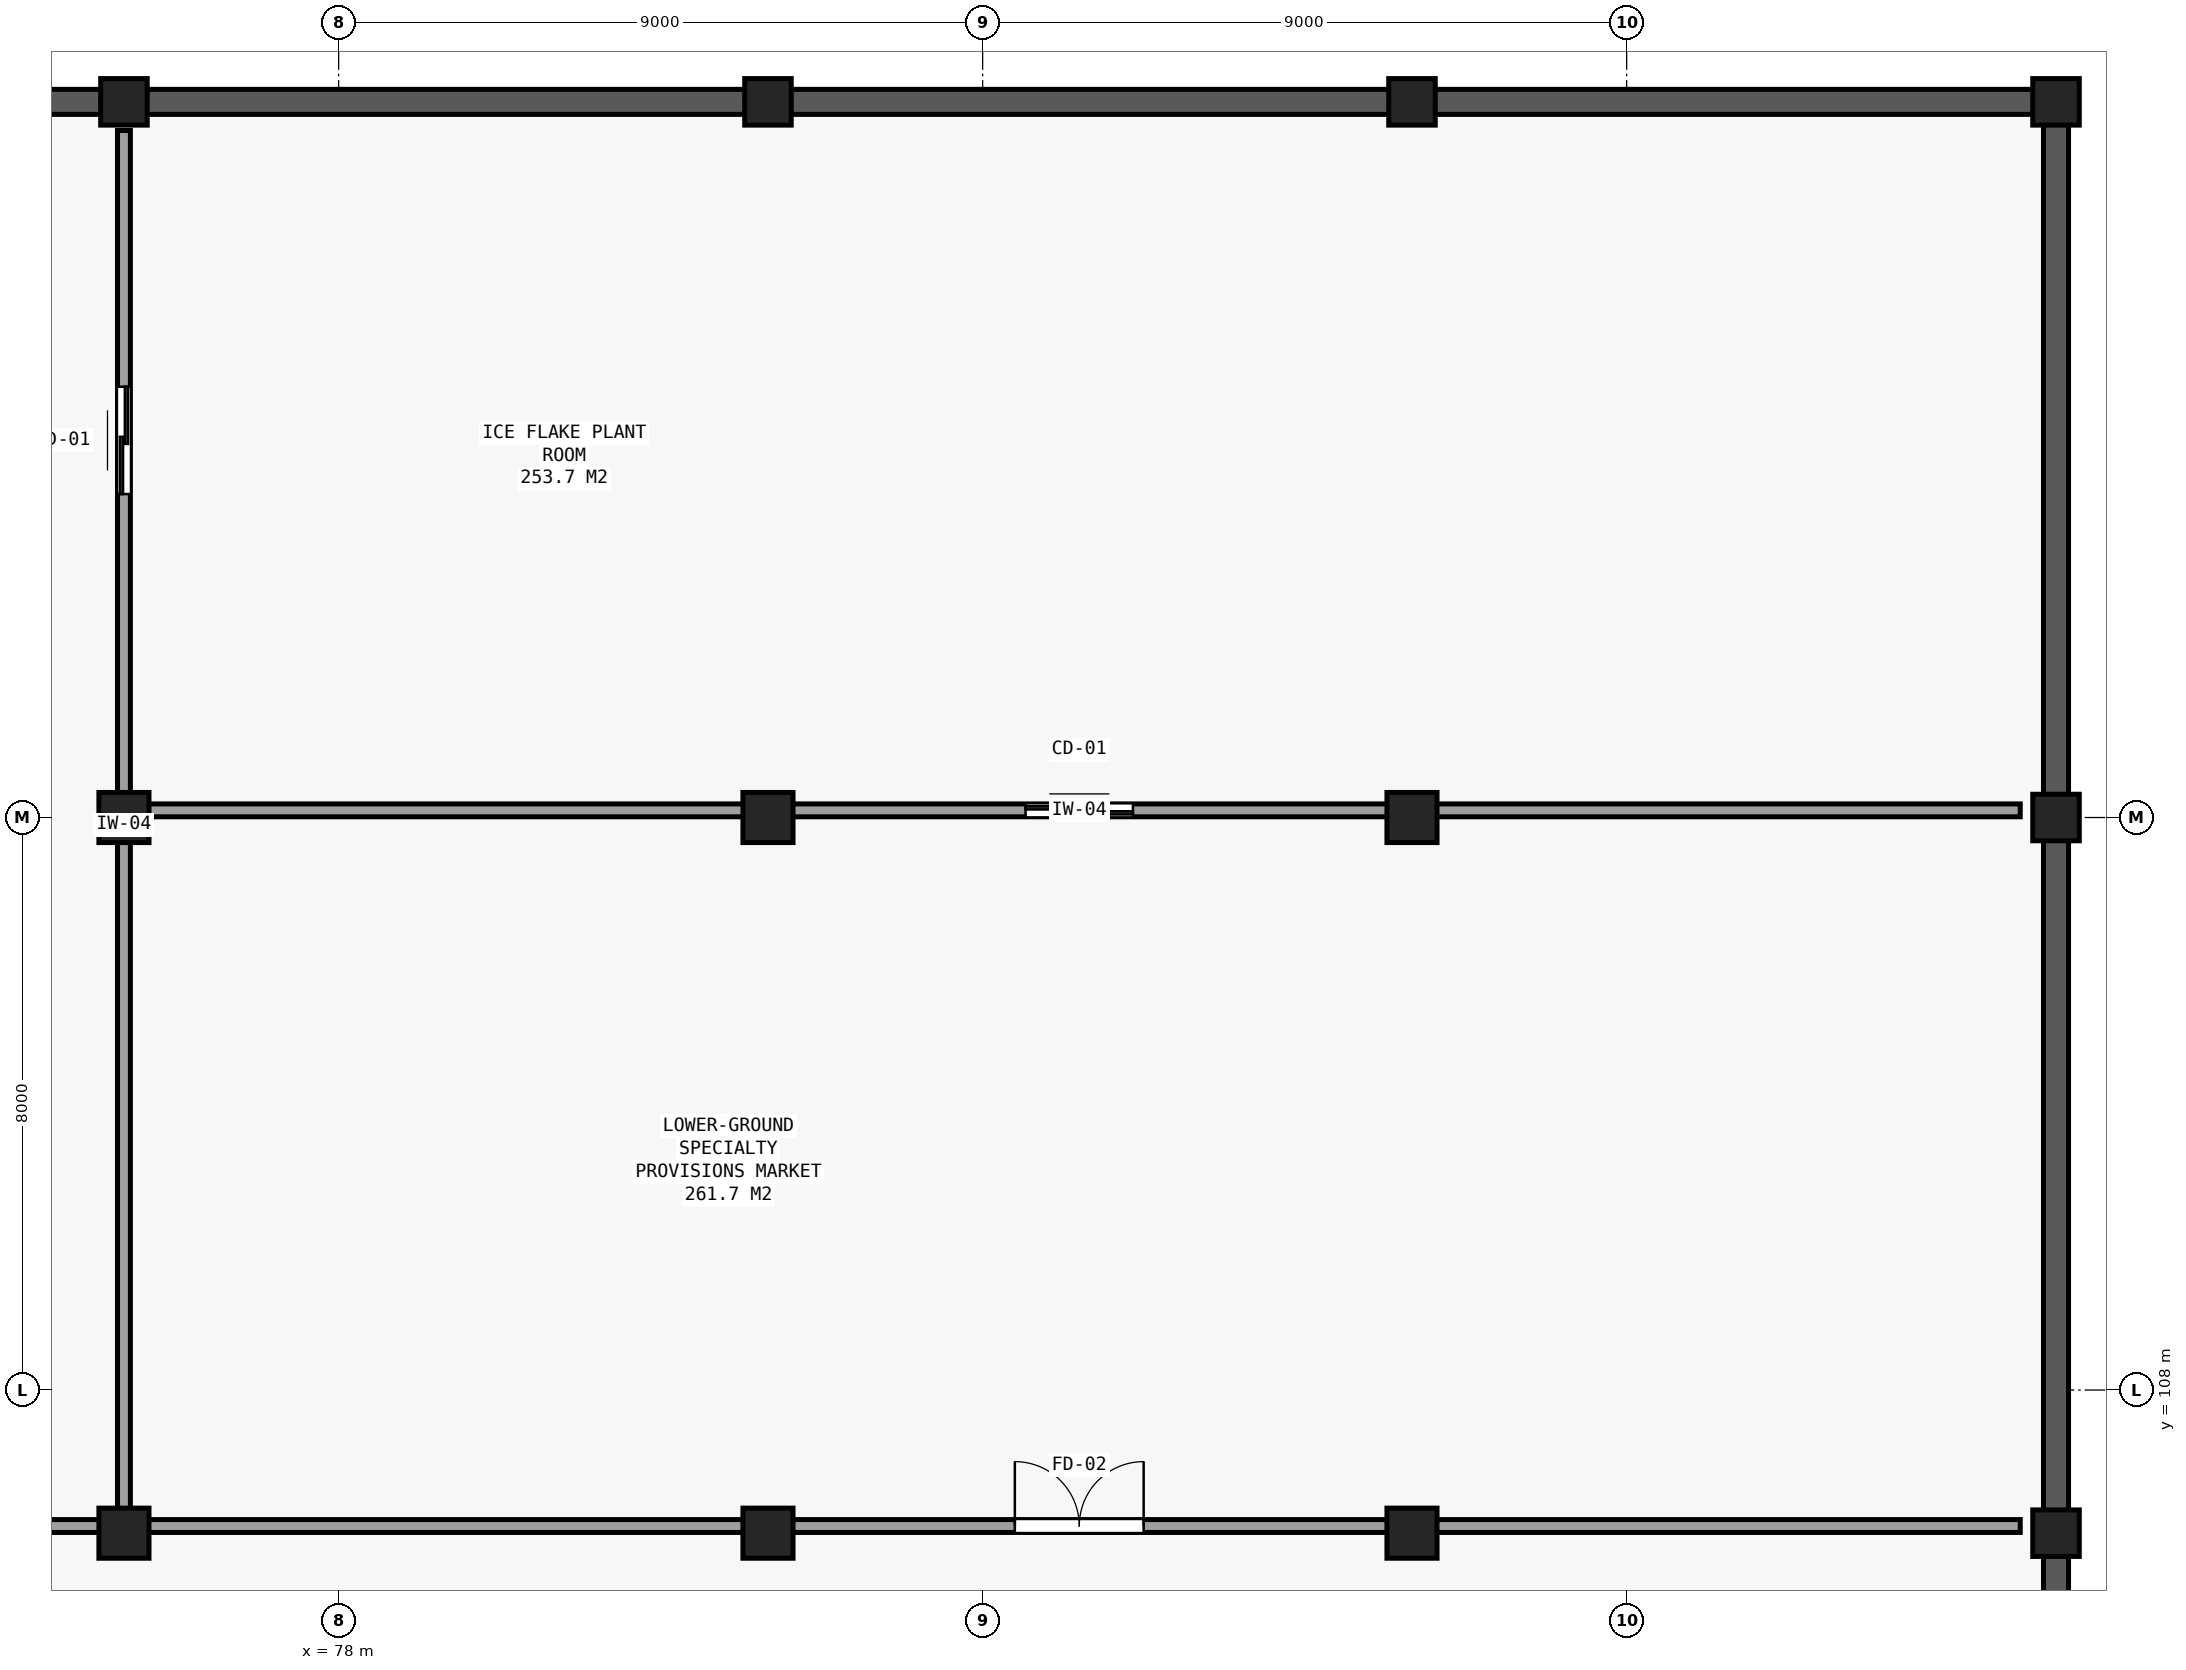
"""IFC4 building model, lengths in metres.
Left out: names, types, materials, properties, quantities, classifications, styles, units other than length and angle.
Written with IfcOpenShell. Run it as: python <this file> out.ifc"""

import sys

from ifc_helpers import new_model, si_unit, direction, frame, frame_2d, origin, origin_2d, place, context, subcontext, project, spatial, rectangle, extrude, element, fill, save


model = new_model("IFC4")
c1 = context("Model", 3, precision=1e-05, world=origin(), true_north=direction((0.0, 1.0)))
c2 = subcontext(c1, "Body", "Model", "MODEL_VIEW")
j1 = project(units=[si_unit("LENGTHUNIT", "METRE"), si_unit("PLANEANGLEUNIT", "RADIAN")], contexts=[c1])
p1 = place(None, origin())
s1 = spatial("IfcSite", under=j1, at=p1, CompositionType="ELEMENT")
p2 = place(p1, origin())
s2 = spatial("IfcBuilding", under=s1, at=p2, CompositionType="ELEMENT")
p3 = place(p2, frame((0.0, 0.0, -4.2)))
s3 = spatial("IfcBuildingStorey", under=s2, at=p3, CompositionType="ELEMENT", Elevation=-4.2)
for number, where, z_axis, x_axis in (
    (1, (75.0, 106.0, -0.4), (0.0, 0.0, 1.0), (1.0, 0.0, 0.0)),
    (2, (75.0, 116.0, -0.4), (0.0, 0.0, 1.0), (1.0, 0.0, 0.0)),
):
    element("IfcColumn", number, at=place(p3, frame(where, z_axis=z_axis, x_axis=x_axis)), inside=s3, PredefinedType="COLUMN", context=c2, shape_type="SweptSolid", body=[
        extrude(rectangle(XDim=0.7, YDim=0.7, at=origin_2d()), origin(), (0.0, 0.0, 1.0), 4.6),
    ])
p4 = place(p3, frame((75.0, 126.0, -0.4), z_axis=(0.0, 0.0, 1.0), x_axis=(1.0, 0.0, 0.0)))
e3 = element("IfcColumn", 3, at=p4, inside=s3, PredefinedType="COLUMN", context=c2, shape_type="SweptSolid", body=[
    extrude(rectangle(XDim=0.65, YDim=0.65, at=origin_2d()), origin(), (0.0, 0.0, 1.0), 4.6),
])
for number, where, z_axis, x_axis in (
    (4, (84.0, 106.0, -0.4), (0.0, 0.0, 1.0), (1.0, 0.0, 0.0)),
    (5, (84.0, 116.0, -0.4), (0.0, 0.0, 1.0), (1.0, 0.0, 0.0)),
):
    element("IfcColumn", number, at=place(p3, frame(where, z_axis=z_axis, x_axis=x_axis)), inside=s3, PredefinedType="COLUMN", context=c2, shape_type="SweptSolid", body=[
        extrude(rectangle(XDim=0.7, YDim=0.7, at=origin_2d()), origin(), (0.0, 0.0, 1.0), 4.6),
    ])
p5 = place(p3, frame((84.0, 126.0, -0.4), z_axis=(0.0, 0.0, 1.0), x_axis=(1.0, 0.0, 0.0)))
e6 = element("IfcColumn", 6, at=p5, inside=s3, PredefinedType="COLUMN", context=c2, shape_type="SweptSolid", body=[
    extrude(rectangle(XDim=0.65, YDim=0.65, at=origin_2d()), origin(), (0.0, 0.0, 1.0), 4.6),
])
for number, where, z_axis, x_axis in (
    (7, (93.0, 106.0, -0.4), (0.0, 0.0, 1.0), (1.0, 0.0, 0.0)),
    (8, (93.0, 116.0, -0.4), (0.0, 0.0, 1.0), (1.0, 0.0, 0.0)),
):
    element("IfcColumn", number, at=place(p3, frame(where, z_axis=z_axis, x_axis=x_axis)), inside=s3, PredefinedType="COLUMN", context=c2, shape_type="SweptSolid", body=[
        extrude(rectangle(XDim=0.7, YDim=0.7, at=origin_2d()), origin(), (0.0, 0.0, 1.0), 4.6),
    ])
for number, where, z_axis, x_axis in (
    (9, (93.0, 126.0, -0.4), (0.0, 0.0, 1.0), (1.0, 0.0, 0.0)),
    (10, (102.0, 106.0, -0.4), (0.0, 0.0, 1.0), (1.0, 0.0, 0.0)),
    (11, (102.0, 116.0, -0.4), (0.0, 0.0, 1.0), (1.0, 0.0, 0.0)),
    (12, (102.0, 126.0, -0.4), (0.0, 0.0, 1.0), (1.0, 0.0, 0.0)),
):
    element("IfcColumn", number, at=place(p3, frame(where, z_axis=z_axis, x_axis=x_axis)), inside=s3, PredefinedType="COLUMN", context=c2, shape_type="SweptSolid", body=[
        extrude(rectangle(XDim=0.65, YDim=0.65, at=origin_2d()), origin(), (0.0, 0.0, 1.0), 4.6),
    ])
for number, where, z_axis, x_axis in (
    (13, (66.0, 126.0, 0.0), (0.0, 0.0, 1.0), (1.0, 0.0, 0.0)),
    (14, (75.0, 126.0, 0.0), (0.0, 0.0, 1.0), (1.0, 0.0, 0.0)),
    (15, (84.0, 126.0, 0.0), (0.0, 0.0, 1.0), (1.0, 0.0, 0.0)),
    (16, (93.0, 126.0, 0.0), (0.0, 0.0, 1.0), (1.0, 0.0, 0.0)),
):
    element("IfcWall", number, at=place(p3, frame(where, z_axis=z_axis, x_axis=x_axis)), inside=s3, PredefinedType="SOLIDWALL", context=c2, shape_type="SweptSolid", body=[
        extrude(rectangle(XDim=9.0, YDim=0.35, at=frame_2d((4.5, 0.0))), origin(), (0.0, 0.0, 1.0), 3.84),
    ])
for number, where, z_axis, x_axis in (
    (17, (102.0, 106.0, 0.0), (0.0, 0.0, 1.0), (0.0, -1.0, 0.0)),
    (18, (102.0, 116.0, 0.0), (0.0, 0.0, 1.0), (0.0, -1.0, 0.0)),
    (19, (102.0, 126.0, 0.0), (0.0, 0.0, 1.0), (0.0, -1.0, 0.0)),
):
    element("IfcWall", number, at=place(p3, frame(where, z_axis=z_axis, x_axis=x_axis)), inside=s3, PredefinedType="SOLIDWALL", context=c2, shape_type="SweptSolid", body=[
        extrude(rectangle(XDim=10.0, YDim=0.35, at=frame_2d((5.0, 0.0))), origin(), (0.0, 0.0, 1.0), 3.84),
    ])
p6 = place(p3, frame((48.2, 106.1, 0.0), z_axis=(0.0, 0.0, 1.0), x_axis=(1.0, 0.0, 0.0)))
e20 = element("IfcWall", 20, at=p6, inside=s3, PredefinedType="PARTITIONING", context=c2, shape_type="SweptSolid", body=[
    extrude(rectangle(XDim=26.6, YDim=0.18, at=frame_2d((13.3, 0.0))), origin(), (0.0, 0.0, 1.0), 2.94),
])
p7 = place(p6, frame((12.55, 0.0, 0.0)))
e21 = element("IfcOpeningElement", 21, at=p7, cuts=e20, PredefinedType="OPENING", context=c2, shape_type="SweptSolid", body=[
    extrude(rectangle(XDim=1.5, YDim=2.25, at=frame_2d((0.75, 1.125))), frame((0.0, 0.1, 0.0), z_axis=(0.0, -1.0, 0.0), x_axis=(1.0, 0.0, 0.0)), (0.0, 0.0, 1.0), 0.2),
])
p8 = place(p3, frame((75.2, 106.1, 0.0), z_axis=(0.0, 0.0, 1.0), x_axis=(1.0, 0.0, 0.0)))
e22 = element("IfcWall", 22, at=p8, inside=s3, PredefinedType="PARTITIONING", context=c2, shape_type="SweptSolid", body=[
    extrude(rectangle(XDim=26.3, YDim=0.18, at=frame_2d((13.15, 0.0))), origin(), (0.0, 0.0, 1.0), 2.94),
])
p9 = place(p8, frame((12.25, 0.0, 0.0)))
e23 = element("IfcOpeningElement", 23, at=p9, cuts=e22, PredefinedType="OPENING", context=c2, shape_type="SweptSolid", body=[
    extrude(rectangle(XDim=1.8, YDim=2.2, at=frame_2d((0.9, 1.1))), frame((0.0, 0.1, 0.0), z_axis=(0.0, -1.0, 0.0), x_axis=(1.0, 0.0, 0.0)), (0.0, 0.0, 1.0), 0.2),
])
p10 = place(p3, frame((75.2, 116.1, 0.0), z_axis=(0.0, 0.0, 1.0), x_axis=(1.0, 0.0, 0.0)))
e24 = element("IfcWall", 24, at=p10, inside=s3, PredefinedType="PARTITIONING", context=c2, shape_type="SweptSolid", body=[
    extrude(rectangle(XDim=26.3, YDim=0.18, at=frame_2d((13.15, 0.0))), origin(), (0.0, 0.0, 1.0), 2.94),
])
p11 = place(p10, frame((12.4, 0.0, 0.0)))
e25 = element("IfcOpeningElement", 25, at=p11, cuts=e24, PredefinedType="OPENING", context=c2, shape_type="SweptSolid", body=[
    extrude(rectangle(XDim=1.5, YDim=2.25, at=frame_2d((0.75, 1.125))), frame((0.0, 0.1, 0.0), z_axis=(0.0, -1.0, 0.0), x_axis=(1.0, 0.0, 0.0)), (0.0, 0.0, 1.0), 0.2),
])
p12 = place(p3, frame((75.0, 106.2, 0.0), z_axis=(0.0, 0.0, 1.0), x_axis=(0.0, 1.0, 0.0)))
e26 = element("IfcWall", 26, at=p12, inside=s3, PredefinedType="PARTITIONING", context=c2, shape_type="SweptSolid", body=[
    extrude(rectangle(XDim=19.4, YDim=0.18, at=frame_2d((9.7, 0.0))), origin(), (0.0, 0.0, 1.0), 2.94),
])
p13 = place(p12, frame((14.32, 0.0, 0.0)))
e27 = element("IfcOpeningElement", 27, at=p13, cuts=e26, PredefinedType="OPENING", context=c2, shape_type="SweptSolid", body=[
    extrude(rectangle(XDim=1.5, YDim=2.25, at=frame_2d((0.75, 1.125))), frame((0.0, 0.1, 0.0), z_axis=(0.0, -1.0, 0.0), x_axis=(1.0, 0.0, 0.0)), (0.0, 0.0, 1.0), 0.2),
])
p14 = place(p9, origin())
e28 = element("IfcDoor", 28, at=p14, inside=s3, OperationType="DOUBLE_DOOR_SINGLE_SWING", PredefinedType="DOOR", context=c2, shape_type="SweptSolid", body=[
    extrude(rectangle(XDim=1.8, YDim=2.2, at=frame_2d((0.9, 1.1))), frame((0.0, 0.025, 0.0), z_axis=(0.0, -1.0, 0.0), x_axis=(1.0, 0.0, 0.0)), (0.0, 0.0, 1.0), 0.05),
])
fill(e23, e28)
p15 = place(p11, origin())
e29 = element("IfcDoor", 29, at=p15, inside=s3, OperationType="SLIDING_TO_LEFT", PredefinedType="DOOR", context=c2, shape_type="SweptSolid", body=[
    extrude(rectangle(XDim=1.5, YDim=2.25, at=frame_2d((0.75, 1.125))), frame((0.0, 0.025, 0.0), z_axis=(0.0, -1.0, 0.0), x_axis=(1.0, 0.0, 0.0)), (0.0, 0.0, 1.0), 0.05),
])
fill(e25, e29)
p16 = place(p13, origin())
e30 = element("IfcDoor", 30, at=p16, inside=s3, OperationType="SLIDING_TO_LEFT", PredefinedType="DOOR", context=c2, shape_type="SweptSolid", body=[
    extrude(rectangle(XDim=1.5, YDim=2.25, at=frame_2d((0.75, 1.125))), frame((0.0, 0.025, 0.0), z_axis=(0.0, -1.0, 0.0), x_axis=(1.0, 0.0, 0.0)), (0.0, 0.0, 1.0), 0.05),
])
fill(e27, e30)
save(model, sys.argv[1])
